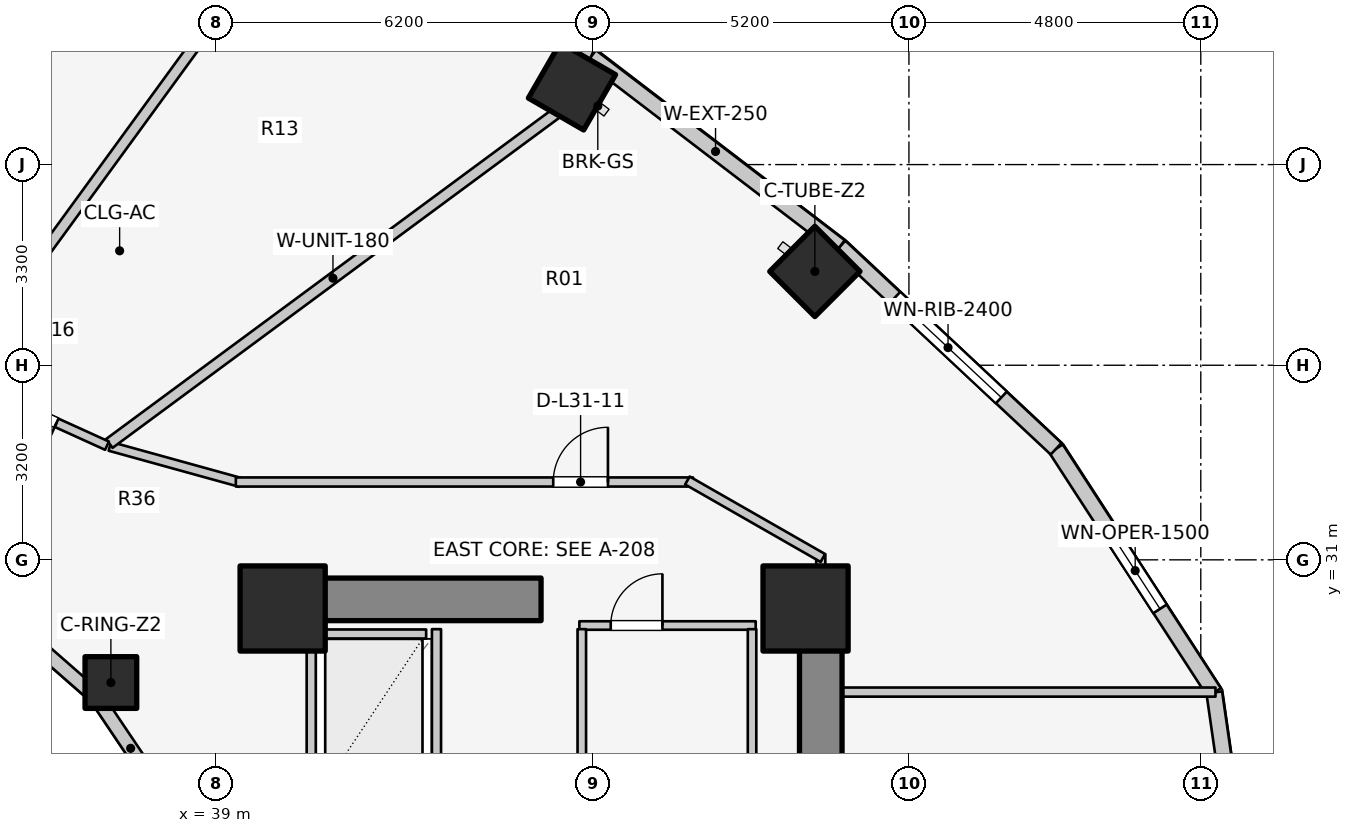
"""IFC4 building model, lengths in metres.
Left out: names, types, materials, properties, quantities, classifications, styles, units other than length and angle.
Written with IfcOpenShell. Run it as: python <this file> out.ifc"""

import sys

from ifc_helpers import new_model, si_unit, direction, frame, frame_2d, origin, origin_2d, place, context, subcontext, project, spatial, rectangle, extrude, element, fill, save


model = new_model("IFC4")
c1 = context("Model", 3, precision=1e-05, world=origin(), true_north=direction((0.0, 1.0)))
c2 = subcontext(c1, "Body", "Model", "MODEL_VIEW")
j1 = project(units=[si_unit("LENGTHUNIT", "METRE"), si_unit("PLANEANGLEUNIT", "RADIAN")], contexts=[c1])
p1 = place(None, origin())
s1 = spatial("IfcSite", under=j1, at=p1, CompositionType="ELEMENT")
p2 = place(p1, origin())
s2 = spatial("IfcBuilding", under=s1, at=p2, CompositionType="ELEMENT")
p3 = place(p2, frame((0.0, 0.0, 104.2)))
s3 = spatial("IfcBuildingStorey", under=s2, at=p3, CompositionType="ELEMENT", Elevation=104.2)
p4 = place(p3, frame((48.95, 17.05, 0.0), z_axis=(0.0, 0.0, 1.0), x_axis=(0.0, 1.0, 0.0)))
e1 = element("IfcWall", 1, at=p4, inside=s3, PredefinedType="SHEAR", context=c2, shape_type="SweptSolid", body=[
    extrude(rectangle(XDim=12.8, YDim=0.7, at=frame_2d((6.4, 0.0))), origin(), (0.0, 0.0, 1.0), 3.1),
])
p5 = place(p3, frame((39.85, 30.35, 0.0), z_axis=(0.0, 0.0, 1.0), x_axis=(1.0, 0.0, 0.0)))
e2 = element("IfcWall", 2, at=p5, inside=s3, PredefinedType="SHEAR", context=c2, shape_type="SweptSolid", body=[
    extrude(rectangle(XDim=4.5, YDim=0.7, at=frame_2d((2.25, 0.0))), origin(), (0.0, 0.0, 1.0), 3.1),
])
for number, where, z_axis, x_axis in (
    (3, (48.7, 30.2, 0.0), (0.0, 0.0, 1.0), (1.0, 0.0, 0.0)),
    (4, (40.1, 30.2, 0.0), (0.0, 0.0, 1.0), (1.0, 0.0, 0.0)),
):
    element("IfcColumn", number, at=place(p3, frame(where, z_axis=z_axis, x_axis=x_axis)), inside=s3, PredefinedType="COLUMN", context=c2, shape_type="SweptSolid", body=[
        extrude(rectangle(XDim=1.4, YDim=1.4, at=origin_2d()), origin(), (0.0, 0.0, 1.0), 3.1),
    ])
p6 = place(p3, frame((37.275, 28.982, 0.0), z_axis=(0.0, 0.0, 1.0), x_axis=(1.0, 0.0, 0.0)))
e5 = element("IfcColumn", 5, at=p6, inside=s3, PredefinedType="COLUMN", context=c2, shape_type="SweptSolid", body=[
    extrude(rectangle(XDim=0.85, YDim=0.85, at=origin_2d()), origin(), (0.0, 0.0, 1.0), 3.1),
])
for number, where, z_axis, x_axis in (
    (6, (48.853, 35.743, 0.0), (0.0, 0.0, 1.0), (0.707, 0.707, 0.0)),
    (7, (44.858, 38.786, 0.0), (0.0, 0.0, 1.0), (0.5, 0.866, 0.0)),
):
    element("IfcColumn", number, at=place(p3, frame(where, z_axis=z_axis, x_axis=x_axis)), inside=s3, PredefinedType="COLUMN", context=c2, shape_type="SweptSolid", body=[
        extrude(rectangle(XDim=1.05, YDim=1.05, at=origin_2d()), origin(), (0.0, 0.0, 1.0), 3.1),
    ])
p7 = place(p3, frame((38.166, 27.06, 0.0), z_axis=(0.0, 0.0, 1.0), x_axis=(-0.558197800898, 0.829707909492, 0.0)))
e8 = element("IfcWall", 8, at=p7, inside=s3, PredefinedType="STANDARD", context=c2, shape_type="SweptSolid", body=[
    extrude(rectangle(XDim=2.027, YDim=0.23, at=frame_2d((1.013, 0.0))), origin(), (0.0, 0.0, 1.0), 2.16),
])
p8 = place(p3, frame((37.035, 28.742, 0.0), z_axis=(0.0, 0.0, 1.0), x_axis=(-0.752576694707, 0.658504607869, 0.0)))
e9 = element("IfcWall", 9, at=p8, inside=s3, PredefinedType="STANDARD", context=c2, shape_type="SweptSolid", body=[
    extrude(rectangle(XDim=1.959, YDim=0.23, at=frame_2d((0.98, 0.0))), origin(), (0.0, 0.0, 1.0), 2.16),
])
p9 = place(p3, frame((56.26, 23.0, 0.0), z_axis=(0.0, 0.0, 1.0), x_axis=(-0.142572472068, 0.98978436551, 0.0)))
e10 = element("IfcWall", 10, at=p9, inside=s3, PredefinedType="STANDARD", context=c2, shape_type="SweptSolid", body=[
    extrude(rectangle(XDim=5.879, YDim=0.26, at=frame_2d((2.939, 0.0))), origin(), (0.0, 0.0, 1.0), 2.85),
])
p10 = place(p9, frame((3.325, 0.0, 0.75)))
e11 = element("IfcOpeningElement", 11, at=p10, cuts=e10, PredefinedType="OPENING", context=c2, shape_type="SweptSolid", body=[
    extrude(rectangle(XDim=1.2, YDim=1.5, at=frame_2d((0.6, 0.75))), frame((0.0, 0.14, 0.0), z_axis=(0.0, -1.0, 0.0), x_axis=(1.0, 0.0, 0.0)), (0.0, 0.0, 1.0), 0.28),
])
p11 = place(p3, frame((55.422, 28.819, 0.0), z_axis=(0.0, 0.0, 1.0), x_axis=(-0.544388392991, 0.838833283541, 0.0)))
e12 = element("IfcWall", 12, at=p11, inside=s3, PredefinedType="STANDARD", context=c2, shape_type="SweptSolid", body=[
    extrude(rectangle(XDim=4.778, YDim=0.26, at=frame_2d((2.389, 0.0))), origin(), (0.0, 0.0, 1.0), 2.85),
])
p12 = place(p11, frame((1.639, 0.0, 0.75)))
e13 = element("IfcOpeningElement", 13, at=p12, cuts=e12, PredefinedType="OPENING", context=c2, shape_type="SweptSolid", body=[
    extrude(rectangle(XDim=1.5, YDim=1.6, at=frame_2d((0.75, 0.8))), frame((0.0, 0.14, 0.0), z_axis=(0.0, -1.0, 0.0), x_axis=(1.0, 0.0, 0.0)), (0.0, 0.0, 1.0), 0.28),
])
p13 = place(p3, frame((52.821, 32.827, 0.0), z_axis=(0.0, 0.0, 1.0), x_axis=(-0.730162452258, 0.68327358599, 0.0)))
e14 = element("IfcWall", 14, at=p13, inside=s3, PredefinedType="STANDARD", context=c2, shape_type="SweptSolid", body=[
    extrude(rectangle(XDim=4.868, YDim=0.26, at=frame_2d((2.434, 0.0))), origin(), (0.0, 0.0, 1.0), 2.85),
])
p14 = place(p13, frame((1.234, 0.0, 0.75)))
e15 = element("IfcOpeningElement", 15, at=p14, cuts=e14, PredefinedType="OPENING", context=c2, shape_type="SweptSolid", body=[
    extrude(rectangle(XDim=2.4, YDim=1.7, at=frame_2d((1.2, 0.85))), frame((0.0, 0.14, 0.0), z_axis=(0.0, -1.0, 0.0), x_axis=(1.0, 0.0, 0.0)), (0.0, 0.0, 1.0), 0.28),
])
p15 = place(p3, frame((49.266, 36.153, 0.0), z_axis=(0.0, 0.0, 1.0), x_axis=(-0.794809810864, 0.606858603427, 0.0)))
e16 = element("IfcWall", 16, at=p15, inside=s3, PredefinedType="STANDARD", context=c2, shape_type="SweptSolid", body=[
    extrude(rectangle(XDim=5.149, YDim=0.26, at=frame_2d((2.575, 0.0))), origin(), (0.0, 0.0, 1.0), 2.85),
])
p16 = place(p3, frame((45.173, 39.278, 0.0), z_axis=(0.0, 0.0, 1.0), x_axis=(-0.914336605747, 0.404955023911, 0.0)))
e17 = element("IfcWall", 17, at=p16, inside=s3, PredefinedType="STANDARD", context=c2, shape_type="SweptSolid", body=[
    extrude(rectangle(XDim=5.859, YDim=0.26, at=frame_2d((2.929, 0.0))), origin(), (0.0, 0.0, 1.0), 2.85),
])
p17 = place(p16, frame((2.179, 0.0, 0.75)))
e18 = element("IfcOpeningElement", 18, at=p17, cuts=e17, PredefinedType="OPENING", context=c2, shape_type="SweptSolid", body=[
    extrude(rectangle(XDim=1.5, YDim=1.6, at=frame_2d((0.75, 0.8))), frame((0.0, 0.14, 0.0), z_axis=(0.0, -1.0, 0.0), x_axis=(1.0, 0.0, 0.0)), (0.0, 0.0, 1.0), 0.28),
])
p18 = place(p3, frame((40.74, 29.78, 0.0), z_axis=(0.0, 0.0, 1.0), x_axis=(1.0, 0.0, 0.0)))
e19 = element("IfcWall", 19, at=p18, inside=s3, PredefinedType="SOLIDWALL", context=c2, shape_type="SweptSolid", body=[
    extrude(rectangle(XDim=1.72, YDim=0.15, at=frame_2d((0.86, 0.0))), origin(), (0.0, 0.0, 1.0), 2.855),
])
for number, where, z_axis, x_axis in (
    (20, (40.57, 27.14, 0.0), (0.0, 0.0, 1.0), (0.0, 1.0, 0.0)),
    (21, (42.63, 27.14, 0.0), (0.0, 0.0, 1.0), (0.0, 1.0, 0.0)),
):
    element("IfcWall", number, at=place(p3, frame(where, z_axis=z_axis, x_axis=x_axis)), inside=s3, PredefinedType="SOLIDWALL", context=c2, shape_type="SweptSolid", body=[
        extrude(rectangle(XDim=2.72, YDim=0.15, at=frame_2d((1.36, 0.0))), origin(), (0.0, 0.0, 1.0), 2.855),
    ])
p19 = place(p3, frame((44.98, 29.92, 0.0), z_axis=(0.0, 0.0, 1.0), x_axis=(1.0, 0.0, 0.0)))
e22 = element("IfcWall", 22, at=p19, inside=s3, PredefinedType="PLUMBINGWALL", context=c2, shape_type="SweptSolid", body=[
    extrude(rectangle(XDim=2.9, YDim=0.14, at=frame_2d((1.45, 0.0))), origin(), (0.0, 0.0, 1.0), 2.855),
])
p20 = place(p19, frame((0.516, 0.0, 0.0)))
e23 = element("IfcOpeningElement", 23, at=p20, cuts=e22, PredefinedType="OPENING", context=c2, shape_type="SweptSolid", body=[
    extrude(rectangle(XDim=0.85, YDim=2.05, at=frame_2d((0.425, 1.025))), frame((0.0, 0.08, 0.0), z_axis=(0.0, -1.0, 0.0), x_axis=(1.0, 0.0, 0.0)), (0.0, 0.0, 1.0), 0.16),
])
for number, where, z_axis, x_axis in (
    (24, (45.02, 25.98, 0.0), (0.0, 0.0, 1.0), (0.0, 1.0, 0.0)),
    (25, (47.82, 25.98, 0.0), (0.0, 0.0, 1.0), (0.0, 1.0, 0.0)),
):
    element("IfcWall", number, at=place(p3, frame(where, z_axis=z_axis, x_axis=x_axis)), inside=s3, PredefinedType="PLUMBINGWALL", context=c2, shape_type="SweptSolid", body=[
        extrude(rectangle(XDim=3.88, YDim=0.14, at=frame_2d((1.94, 0.0))), origin(), (0.0, 0.0, 1.0), 2.855),
    ])
p21 = place(p3, frame((48.95, 28.825, 0.0), z_axis=(0.0, 0.0, 1.0), x_axis=(1.0, 0.0, 0.0)))
e26 = element("IfcWall", 26, at=p21, inside=s3, PredefinedType="PARTITIONING", context=c2, shape_type="SweptSolid", body=[
    extrude(rectangle(XDim=6.492, YDim=0.15, at=frame_2d((3.246, 0.0))), origin(), (0.0, 0.0, 1.0), 2.855),
])
p22 = place(p3, frame((48.95, 29.8, 0.0), z_axis=(0.0, 0.0, 1.0), x_axis=(0.0, 1.0, 0.0)))
e27 = element("IfcWall", 27, at=p22, inside=s3, PredefinedType="PARTITIONING", context=c2, shape_type="SweptSolid", body=[
    extrude(rectangle(XDim=1.29, YDim=0.15, at=frame_2d((0.645, 0.0))), origin(), (0.0, 0.0, 1.0), 2.142),
])
p23 = place(p3, frame((37.258, 32.867, 0.0), z_axis=(0.0, 0.0, 1.0), x_axis=(0.963833843713, -0.266503886865, 0.0)))
e28 = element("IfcWall", 28, at=p23, inside=s3, PredefinedType="PARTITIONING", context=c2, shape_type="SweptSolid", body=[
    extrude(rectangle(XDim=2.232, YDim=0.15, at=frame_2d((1.116, 0.0))), origin(), (0.0, 0.0, 1.0), 2.272),
])
p24 = place(p3, frame((39.33, 32.28, 0.0), z_axis=(0.0, 0.0, 1.0), x_axis=(1.0, 0.0, 0.0)))
e29 = element("IfcWall", 29, at=p24, inside=s3, PredefinedType="PARTITIONING", context=c2, shape_type="SweptSolid", body=[
    extrude(rectangle(XDim=7.52, YDim=0.15, at=frame_2d((3.76, 0.0))), origin(), (0.0, 0.0, 1.0), 2.272),
])
p25 = place(p24, frame((5.22, 0.0, 0.0)))
e30 = element("IfcOpeningElement", 30, at=p25, cuts=e29, PredefinedType="OPENING", context=c2, shape_type="SweptSolid", body=[
    extrude(rectangle(XDim=0.9, YDim=2.1, at=frame_2d((0.45, 1.05))), frame((0.0, 0.085, 0.0), z_axis=(0.0, -1.0, 0.0), x_axis=(1.0, 0.0, 0.0)), (0.0, 0.0, 1.0), 0.17),
])
p26 = place(p3, frame((46.757, 32.305, 0.0), z_axis=(0.0, 0.0, 1.0), x_axis=(0.867991349648, -0.496579315857, 0.0)))
e31 = element("IfcWall", 31, at=p26, inside=s3, PredefinedType="PARTITIONING", context=c2, shape_type="SweptSolid", body=[
    extrude(rectangle(XDim=2.567, YDim=0.15, at=frame_2d((1.283, 0.0))), origin(), (0.0, 0.0, 1.0), 2.142),
])
p27 = place(p3, frame((37.249, 32.914, 0.0), z_axis=(0.0, 0.0, 1.0), x_axis=(0.80430981394, 0.594210167533, 0.0)))
e32 = element("IfcWall", 32, at=p27, inside=s3, PredefinedType="PARTITIONING", context=c2, shape_type="SweptSolid", body=[
    extrude(rectangle(XDim=9.146, YDim=0.18, at=frame_2d((4.573, 0.0))), origin(), (0.0, 0.0, 1.0), 2.272),
])
p28 = place(p3, frame((34.727, 34.066, 0.0), z_axis=(0.0, 0.0, 1.0), x_axis=(0.589042211476, 0.808102266486, 0.0)))
e33 = element("IfcWall", 33, at=p28, inside=s3, PredefinedType="PARTITIONING", context=c2, shape_type="SweptSolid", body=[
    extrude(rectangle(XDim=8.101, YDim=0.18, at=frame_2d((4.051, 0.0))), origin(), (0.0, 0.0, 1.0), 2.272),
])
p29 = place(p3, frame((37.211, 32.877, 0.0), z_axis=(0.0, 0.0, 1.0), x_axis=(-0.910568469686, 0.41335827319, 0.0)))
e34 = element("IfcWall", 34, at=p29, inside=s3, PredefinedType="PARTITIONING", context=c2, shape_type="SweptSolid", body=[
    extrude(rectangle(XDim=2.772, YDim=0.15, at=frame_2d((1.386, 0.0))), origin(), (0.0, 0.0, 1.0), 2.272),
])
p30 = place(p29, frame((0.911, 0.0, 0.0)))
e35 = element("IfcOpeningElement", 35, at=p30, cuts=e34, PredefinedType="OPENING", context=c2, shape_type="SweptSolid", body=[
    extrude(rectangle(XDim=0.95, YDim=2.1, at=frame_2d((0.475, 1.05))), frame((0.0, 0.085, 0.0), z_axis=(0.0, -1.0, 0.0), x_axis=(1.0, 0.0, 0.0)), (0.0, 0.0, 1.0), 0.17),
])
p31 = place(p12, origin())
e36 = element("IfcWindow", 36, at=p31, inside=s3, PartitioningType="SINGLE_PANEL", PredefinedType="WINDOW", context=c2, shape_type="SweptSolid", body=[
    extrude(rectangle(XDim=1.5, YDim=1.6, at=frame_2d((0.75, 0.8))), frame((0.0, 0.03, 0.0), z_axis=(0.0, -1.0, 0.0), x_axis=(1.0, 0.0, 0.0)), (0.0, 0.0, 1.0), 0.06),
])
fill(e13, e36)
p32 = place(p14, origin())
e37 = element("IfcWindow", 37, at=p32, inside=s3, PartitioningType="SINGLE_PANEL", PredefinedType="WINDOW", context=c2, shape_type="SweptSolid", body=[
    extrude(rectangle(XDim=2.4, YDim=1.7, at=frame_2d((1.2, 0.85))), frame((0.0, 0.03, 0.0), z_axis=(0.0, -1.0, 0.0), x_axis=(1.0, 0.0, 0.0)), (0.0, 0.0, 1.0), 0.06),
])
fill(e15, e37)
p33 = place(p20, origin())
e38 = element("IfcDoor", 38, at=p33, inside=s3, OperationType="SINGLE_SWING_RIGHT", PredefinedType="DOOR", context=c2, shape_type="SweptSolid", body=[
    extrude(rectangle(XDim=0.85, YDim=2.05, at=frame_2d((0.425, 1.025))), frame((0.0, 0.025, 0.0), z_axis=(0.0, -1.0, 0.0), x_axis=(1.0, 0.0, 0.0)), (0.0, 0.0, 1.0), 0.05),
])
fill(e23, e38)
p34 = place(p25, origin())
e39 = element("IfcDoor", 39, at=p34, inside=s3, OperationType="SINGLE_SWING_RIGHT", PredefinedType="DOOR", context=c2, shape_type="SweptSolid", body=[
    extrude(rectangle(XDim=0.9, YDim=2.1, at=frame_2d((0.45, 1.05))), frame((0.0, 0.025, 0.0), z_axis=(0.0, -1.0, 0.0), x_axis=(1.0, 0.0, 0.0)), (0.0, 0.0, 1.0), 0.05),
])
fill(e30, e39)
p35 = place(p30, origin())
e40 = element("IfcDoor", 40, at=p35, inside=s3, OperationType="SINGLE_SWING_LEFT", PredefinedType="DOOR", context=c2, shape_type="SweptSolid", body=[
    extrude(rectangle(XDim=0.95, YDim=2.1, at=frame_2d((0.475, 1.05))), frame((0.0, 0.025, 0.0), z_axis=(0.0, -1.0, 0.0), x_axis=(1.0, 0.0, 0.0)), (0.0, 0.0, 1.0), 0.05),
])
fill(e35, e40)
save(model, sys.argv[1])
